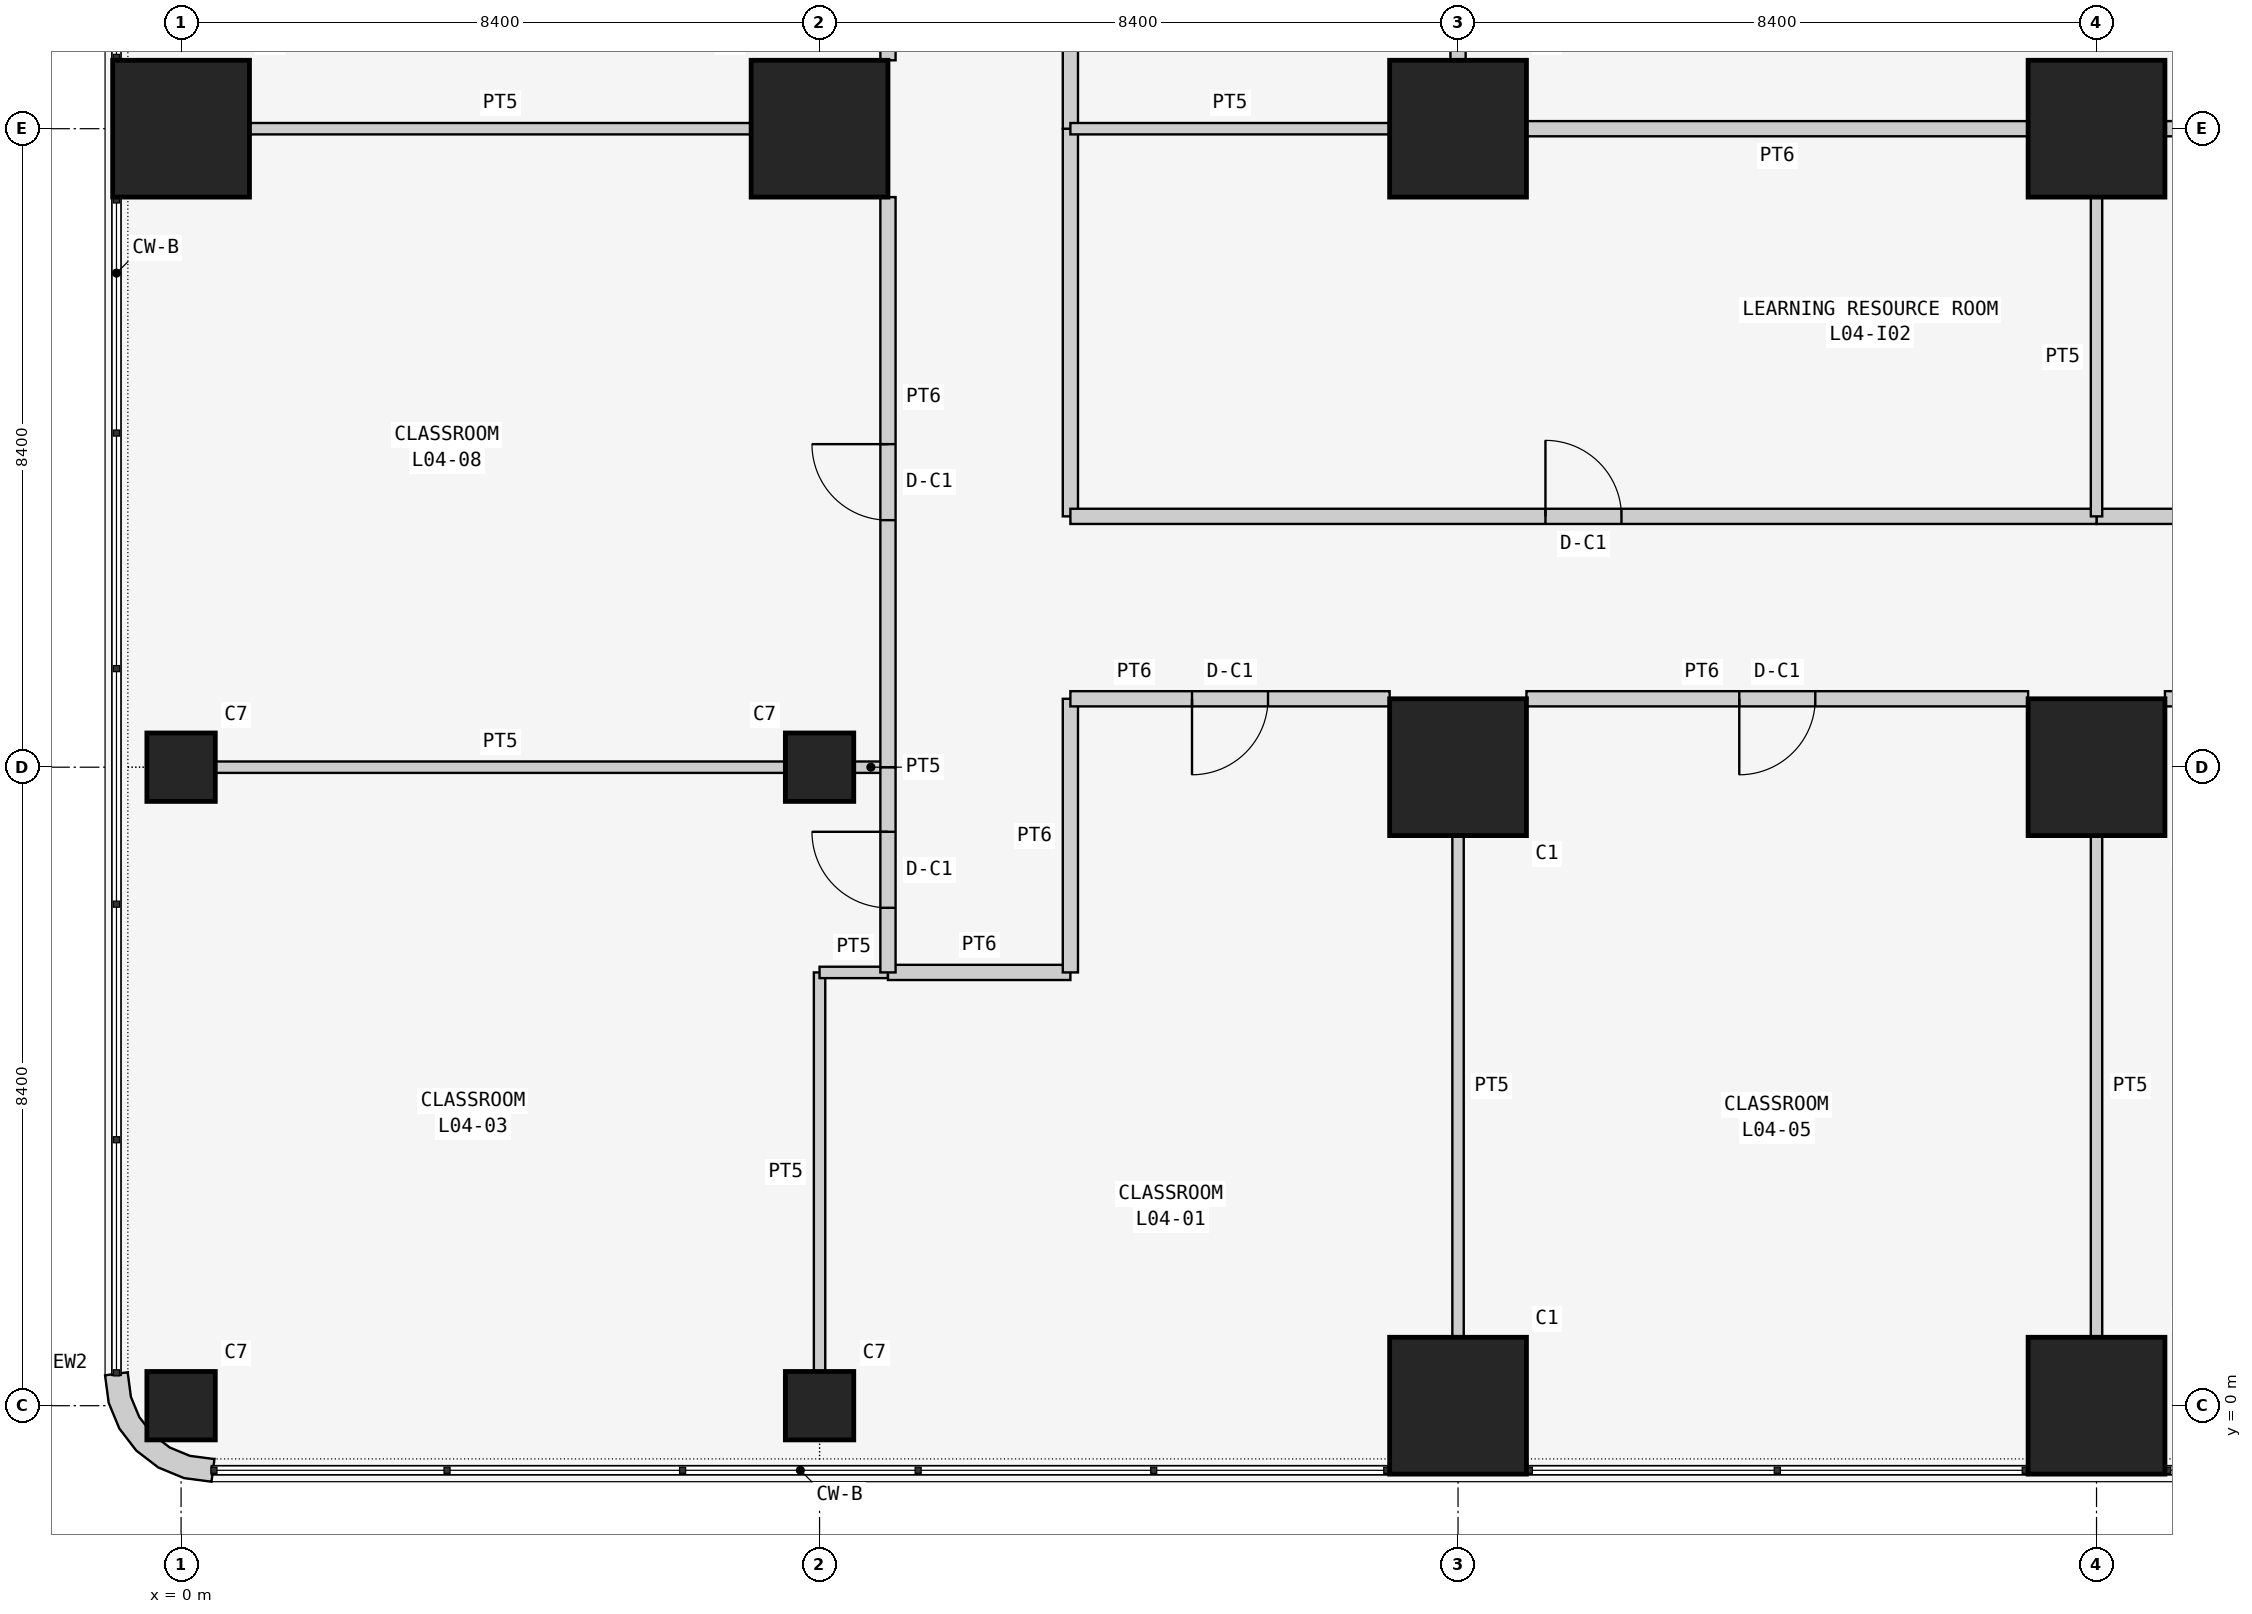
"""IFC4 building model, lengths in metres.
Left out: names, types, materials, properties, quantities, classifications, styles, units other than length and angle.
Written with IfcOpenShell. Run it as: python <this file> out.ifc"""

import sys

from ifc_helpers import new_model, si_unit, direction, frame, frame_2d, origin, origin_2d, place, context, subcontext, project, spatial, polyline, rectangle, outline, extrude, element, fill, save


model = new_model("IFC4")
c1 = context("Model", 3, precision=1e-05, world=origin(), true_north=direction((0.0, 1.0)))
c2 = subcontext(c1, "Body", "Model", "MODEL_VIEW")
j1 = project(units=[si_unit("LENGTHUNIT", "METRE"), si_unit("PLANEANGLEUNIT", "RADIAN")], contexts=[c1])
p1 = place(None, origin())
s1 = spatial("IfcSite", under=j1, at=p1, CompositionType="ELEMENT")
p2 = place(p1, origin())
s2 = spatial("IfcBuilding", under=s1, at=p2, CompositionType="ELEMENT")
p3 = place(p2, frame((0.0, 0.0, 19.5)))
s3 = spatial("IfcBuildingStorey", under=s2, at=p3, CompositionType="ELEMENT", Elevation=19.5)
for number, where, z_axis, x_axis in (
    (1, (0.0, 0.0, 0.0), (0.0, 0.0, 1.0), (1.0, 0.0, 0.0)),
    (2, (0.0, 8.4, 0.0), (0.0, 0.0, 1.0), (1.0, 0.0, 0.0)),
):
    element("IfcColumn", number, at=place(p3, frame(where, z_axis=z_axis, x_axis=x_axis)), inside=s3, PredefinedType="COLUMN", context=c2, shape_type="SweptSolid", body=[
        extrude(rectangle(XDim=0.9, YDim=0.9, at=origin_2d()), origin(), (0.0, 0.0, 1.0), 4.5),
    ])
p4 = place(p3, frame((0.0, 16.8, 0.0), z_axis=(0.0, 0.0, 1.0), x_axis=(1.0, 0.0, 0.0)))
e3 = element("IfcColumn", 3, at=p4, inside=s3, PredefinedType="COLUMN", context=c2, shape_type="SweptSolid", body=[
    extrude(rectangle(XDim=1.8, YDim=1.8, at=origin_2d()), origin(), (0.0, 0.0, 1.0), 4.5),
])
for number, where, z_axis, x_axis in (
    (4, (8.4, 0.0, 0.0), (0.0, 0.0, 1.0), (1.0, 0.0, 0.0)),
    (5, (8.4, 8.4, 0.0), (0.0, 0.0, 1.0), (1.0, 0.0, 0.0)),
):
    element("IfcColumn", number, at=place(p3, frame(where, z_axis=z_axis, x_axis=x_axis)), inside=s3, PredefinedType="COLUMN", context=c2, shape_type="SweptSolid", body=[
        extrude(rectangle(XDim=0.9, YDim=0.9, at=origin_2d()), origin(), (0.0, 0.0, 1.0), 4.5),
    ])
for number, where, z_axis, x_axis in (
    (6, (8.4, 16.8, 0.0), (0.0, 0.0, 1.0), (1.0, 0.0, 0.0)),
    (7, (16.8, 0.0, 0.0), (0.0, 0.0, 1.0), (1.0, 0.0, 0.0)),
    (8, (16.8, 8.4, 0.0), (0.0, 0.0, 1.0), (1.0, 0.0, 0.0)),
    (9, (16.8, 16.8, 0.0), (0.0, 0.0, 1.0), (1.0, 0.0, 0.0)),
    (10, (25.2, 0.0, 0.0), (0.0, 0.0, 1.0), (1.0, 0.0, 0.0)),
    (11, (25.2, 8.4, 0.0), (0.0, 0.0, 1.0), (1.0, 0.0, 0.0)),
    (12, (25.2, 16.8, 0.0), (0.0, 0.0, 1.0), (1.0, 0.0, 0.0)),
):
    element("IfcColumn", number, at=place(p3, frame(where, z_axis=z_axis, x_axis=x_axis)), inside=s3, PredefinedType="COLUMN", context=c2, shape_type="SweptSolid", body=[
        extrude(rectangle(XDim=1.8, YDim=1.8, at=origin_2d()), origin(), (0.0, 0.0, 1.0), 4.5),
    ])
p5 = place(p3, frame((-0.848, 0.445, 0.0), z_axis=(0.0, 0.0, 1.0), x_axis=(-0.707106781187, -0.707106781187, 0.0)))
e13 = element("IfcWall", 13, at=p5, inside=s3, PredefinedType="SOLIDWALL", context=c2, shape_type="SweptSolid", body=[
    extrude(outline(polyline([(0.139, 1.904), (-0.101, 1.72), (-0.087, 1.706), (0.1, 1.463), (0.209, 1.198), (0.247, 0.914), (0.209, 0.63), (0.1, 0.365), (-0.087, 0.122), (-0.101, 0.108), (0.139, -0.076), (0.362, 0.214), (0.502, 0.552), (0.549, 0.914), (0.502, 1.276), (0.362, 1.614), (0.139, 1.904)])), origin(), (0.0, 0.0, 1.0), 4.3),
])
p6 = place(p3, frame((8.4, 0.45, 0.0), z_axis=(0.0, 0.0, 1.0), x_axis=(0.0, 1.0, 0.0)))
e14 = element("IfcWall", 14, at=p6, inside=s3, PredefinedType="PARTITIONING", context=c2, shape_type="SweptSolid", body=[
    extrude(rectangle(XDim=5.25, YDim=0.15, at=frame_2d((2.625, 0.0))), origin(), (0.0, 0.0, 1.0), 3.543),
])
p7 = place(p3, frame((8.4, 5.7, 0.0), z_axis=(0.0, 0.0, 1.0), x_axis=(1.0, 0.0, 0.0)))
e15 = element("IfcWall", 15, at=p7, inside=s3, PredefinedType="PARTITIONING", context=c2, shape_type="SweptSolid", body=[
    extrude(rectangle(XDim=0.9, YDim=0.15, at=frame_2d((0.45, 0.0))), origin(), (0.0, 0.0, 1.0), 4.3),
])
p8 = place(p3, frame((16.8, 7.5, 0.0), z_axis=(0.0, 0.0, 1.0), x_axis=(0.0, -1.0, 0.0)))
e16 = element("IfcWall", 16, at=p8, inside=s3, PredefinedType="PARTITIONING", context=c2, shape_type="SweptSolid", body=[
    extrude(rectangle(XDim=6.6, YDim=0.15, at=frame_2d((3.3, 0.0))), origin(), (0.0, 0.0, 1.0), 3.543),
])
p9 = place(p3, frame((9.3, 5.7, 0.0), z_axis=(0.0, 0.0, 1.0), x_axis=(1.0, 0.0, 0.0)))
e17 = element("IfcWall", 17, at=p9, inside=s3, PredefinedType="PARTITIONING", context=c2, shape_type="SweptSolid", body=[
    extrude(rectangle(XDim=2.4, YDim=0.2, at=frame_2d((1.2, 0.0))), origin(), (0.0, 0.0, 1.0), 4.3),
])
p10 = place(p3, frame((11.7, 5.7, 0.0), z_axis=(0.0, 0.0, 1.0), x_axis=(0.0, 1.0, 0.0)))
e18 = element("IfcWall", 18, at=p10, inside=s3, PredefinedType="PARTITIONING", context=c2, shape_type="SweptSolid", body=[
    extrude(rectangle(XDim=3.6, YDim=0.2, at=frame_2d((1.8, 0.0))), origin(), (0.0, 0.0, 1.0), 4.3),
])
p11 = place(p3, frame((11.7, 9.3, 0.0), z_axis=(0.0, 0.0, 1.0), x_axis=(1.0, 0.0, 0.0)))
e19 = element("IfcWall", 19, at=p11, inside=s3, PredefinedType="PARTITIONING", context=c2, shape_type="SweptSolid", body=[
    extrude(rectangle(XDim=4.2, YDim=0.2, at=frame_2d((2.1, 0.0))), origin(), (0.0, 0.0, 1.0), 4.3),
])
p12 = place(p11, frame((1.6, 0.0, 0.0)))
e20 = element("IfcOpeningElement", 20, at=p12, cuts=e19, PredefinedType="OPENING", context=c2, shape_type="SweptSolid", body=[
    extrude(rectangle(XDim=1.0, YDim=2.1, at=frame_2d((0.5, 1.05))), frame((0.0, 0.11, 0.0), z_axis=(0.0, -1.0, 0.0), x_axis=(1.0, 0.0, 0.0)), (0.0, 0.0, 1.0), 0.22),
])
p13 = place(p3, frame((0.45, 8.4, 0.0), z_axis=(0.0, 0.0, 1.0), x_axis=(1.0, 0.0, 0.0)))
e21 = element("IfcWall", 21, at=p13, inside=s3, PredefinedType="PARTITIONING", context=c2, shape_type="SweptSolid", body=[
    extrude(rectangle(XDim=7.5, YDim=0.15, at=frame_2d((3.75, 0.0))), origin(), (0.0, 0.0, 1.0), 3.543),
])
p14 = place(p3, frame((8.85, 8.4, 0.0), z_axis=(0.0, 0.0, 1.0), x_axis=(1.0, 0.0, 0.0)))
e22 = element("IfcWall", 22, at=p14, inside=s3, PredefinedType="PARTITIONING", context=c2, shape_type="SweptSolid", body=[
    extrude(rectangle(XDim=0.45, YDim=0.15, at=frame_2d((0.225, 0.0))), origin(), (0.0, 0.0, 1.0), 3.543),
])
p15 = place(p3, frame((9.3, 8.4, 0.0), z_axis=(0.0, 0.0, 1.0), x_axis=(0.0, -1.0, 0.0)))
e23 = element("IfcWall", 23, at=p15, inside=s3, PredefinedType="PARTITIONING", context=c2, shape_type="SweptSolid", body=[
    extrude(rectangle(XDim=2.7, YDim=0.2, at=frame_2d((1.35, 0.0))), origin(), (0.0, 0.0, 1.0), 4.3),
])
p16 = place(p15, frame((0.85, 0.0, 0.0)))
e24 = element("IfcOpeningElement", 24, at=p16, cuts=e23, PredefinedType="OPENING", context=c2, shape_type="SweptSolid", body=[
    extrude(rectangle(XDim=1.0, YDim=2.1, at=frame_2d((0.5, 1.05))), frame((0.0, 0.11, 0.0), z_axis=(0.0, -1.0, 0.0), x_axis=(1.0, 0.0, 0.0)), (0.0, 0.0, 1.0), 0.22),
])
p17 = place(p3, frame((25.2, 7.5, 0.0), z_axis=(0.0, 0.0, 1.0), x_axis=(0.0, -1.0, 0.0)))
e25 = element("IfcWall", 25, at=p17, inside=s3, PredefinedType="PARTITIONING", context=c2, shape_type="SweptSolid", body=[
    extrude(rectangle(XDim=6.6, YDim=0.15, at=frame_2d((3.3, 0.0))), origin(), (0.0, 0.0, 1.0), 3.543),
])
p18 = place(p3, frame((17.7, 9.3, 0.0), z_axis=(0.0, 0.0, 1.0), x_axis=(1.0, 0.0, 0.0)))
e26 = element("IfcWall", 26, at=p18, inside=s3, PredefinedType="PARTITIONING", context=c2, shape_type="SweptSolid", body=[
    extrude(rectangle(XDim=6.6, YDim=0.2, at=frame_2d((3.3, 0.0))), origin(), (0.0, 0.0, 1.0), 4.3),
])
p19 = place(p18, frame((2.8, 0.0, 0.0)))
e27 = element("IfcOpeningElement", 27, at=p19, cuts=e26, PredefinedType="OPENING", context=c2, shape_type="SweptSolid", body=[
    extrude(rectangle(XDim=1.0, YDim=2.1, at=frame_2d((0.5, 1.05))), frame((0.0, 0.11, 0.0), z_axis=(0.0, -1.0, 0.0), x_axis=(1.0, 0.0, 0.0)), (0.0, 0.0, 1.0), 0.22),
])
p20 = place(p3, frame((26.1, 9.3, 0.0), z_axis=(0.0, 0.0, 1.0), x_axis=(1.0, 0.0, 0.0)))
e28 = element("IfcWall", 28, at=p20, inside=s3, PredefinedType="PARTITIONING", context=c2, shape_type="SweptSolid", body=[
    extrude(rectangle(XDim=6.6, YDim=0.2, at=frame_2d((3.3, 0.0))), origin(), (0.0, 0.0, 1.0), 4.3),
])
p21 = place(p20, frame((2.8, 0.0, 0.0)))
e29 = element("IfcOpeningElement", 29, at=p21, cuts=e28, PredefinedType="OPENING", context=c2, shape_type="SweptSolid", body=[
    extrude(rectangle(XDim=1.0, YDim=2.1, at=frame_2d((0.5, 1.05))), frame((0.0, 0.11, 0.0), z_axis=(0.0, -1.0, 0.0), x_axis=(1.0, 0.0, 0.0)), (0.0, 0.0, 1.0), 0.22),
])
p22 = place(p3, frame((0.9, 16.8, 0.0), z_axis=(0.0, 0.0, 1.0), x_axis=(1.0, 0.0, 0.0)))
e30 = element("IfcWall", 30, at=p22, inside=s3, PredefinedType="PARTITIONING", context=c2, shape_type="SweptSolid", body=[
    extrude(rectangle(XDim=6.6, YDim=0.15, at=frame_2d((3.3, 0.0))), origin(), (0.0, 0.0, 1.0), 3.543),
])
p23 = place(p3, frame((9.3, 15.9, 0.0), z_axis=(0.0, 0.0, 1.0), x_axis=(0.0, -1.0, 0.0)))
e31 = element("IfcWall", 31, at=p23, inside=s3, PredefinedType="PARTITIONING", context=c2, shape_type="SweptSolid", body=[
    extrude(rectangle(XDim=7.5, YDim=0.2, at=frame_2d((3.75, 0.0))), origin(), (0.0, 0.0, 1.0), 4.3),
])
p24 = place(p23, frame((3.25, 0.0, 0.0)))
e32 = element("IfcOpeningElement", 32, at=p24, cuts=e31, PredefinedType="OPENING", context=c2, shape_type="SweptSolid", body=[
    extrude(rectangle(XDim=1.0, YDim=2.1, at=frame_2d((0.5, 1.05))), frame((0.0, 0.11, 0.0), z_axis=(0.0, -1.0, 0.0), x_axis=(1.0, 0.0, 0.0)), (0.0, 0.0, 1.0), 0.22),
])
p25 = place(p3, frame((9.3, 24.3, 0.0), z_axis=(0.0, 0.0, 1.0), x_axis=(0.0, -1.0, 0.0)))
e33 = element("IfcWall", 33, at=p25, inside=s3, PredefinedType="PARTITIONING", context=c2, shape_type="SweptSolid", body=[
    extrude(rectangle(XDim=6.6, YDim=0.2, at=frame_2d((3.3, 0.0))), origin(), (0.0, 0.0, 1.0), 4.3),
])
p26 = place(p25, frame((2.8, 0.0, 0.0)))
e34 = element("IfcOpeningElement", 34, at=p26, cuts=e33, PredefinedType="OPENING", context=c2, shape_type="SweptSolid", body=[
    extrude(rectangle(XDim=1.0, YDim=2.1, at=frame_2d((0.5, 1.05))), frame((0.0, 0.11, 0.0), z_axis=(0.0, -1.0, 0.0), x_axis=(1.0, 0.0, 0.0)), (0.0, 0.0, 1.0), 0.22),
])
p27 = place(p3, frame((25.2, 11.7, 0.0), z_axis=(0.0, 0.0, 1.0), x_axis=(1.0, 0.0, 0.0)))
e35 = element("IfcWall", 35, at=p27, inside=s3, PredefinedType="PARTITIONING", context=c2, shape_type="SweptSolid", body=[
    extrude(rectangle(XDim=16.8, YDim=0.2, at=frame_2d((8.4, 0.0))), origin(), (0.0, 0.0, 1.0), 4.3),
])
p28 = place(p27, frame((7.9, 0.0, 0.0)))
e36 = element("IfcOpeningElement", 36, at=p28, cuts=e35, PredefinedType="OPENING", context=c2, shape_type="SweptSolid", body=[
    extrude(rectangle(XDim=1.0, YDim=2.1, at=frame_2d((0.5, 1.05))), frame((0.0, 0.11, 0.0), z_axis=(0.0, -1.0, 0.0), x_axis=(1.0, 0.0, 0.0)), (0.0, 0.0, 1.0), 0.22),
])
p29 = place(p3, frame((11.7, 16.8, 0.0), z_axis=(0.0, 0.0, 1.0), x_axis=(0.0, -1.0, 0.0)))
e37 = element("IfcWall", 37, at=p29, inside=s3, PredefinedType="PARTITIONING", context=c2, shape_type="SweptSolid", body=[
    extrude(rectangle(XDim=5.1, YDim=0.2, at=frame_2d((2.55, 0.0))), origin(), (0.0, 0.0, 1.0), 4.3),
])
p30 = place(p3, frame((11.7, 11.7, 0.0), z_axis=(0.0, 0.0, 1.0), x_axis=(1.0, 0.0, 0.0)))
e38 = element("IfcWall", 38, at=p30, inside=s3, PredefinedType="PARTITIONING", context=c2, shape_type="SweptSolid", body=[
    extrude(rectangle(XDim=13.5, YDim=0.2, at=frame_2d((6.75, 0.0))), origin(), (0.0, 0.0, 1.0), 4.3),
])
p31 = place(p30, frame((6.25, 0.0, 0.0)))
e39 = element("IfcOpeningElement", 39, at=p31, cuts=e38, PredefinedType="OPENING", context=c2, shape_type="SweptSolid", body=[
    extrude(rectangle(XDim=1.0, YDim=2.1, at=frame_2d((0.5, 1.05))), frame((0.0, 0.11, 0.0), z_axis=(0.0, -1.0, 0.0), x_axis=(1.0, 0.0, 0.0)), (0.0, 0.0, 1.0), 0.22),
])
p32 = place(p3, frame((11.7, 25.2, 0.0), z_axis=(0.0, 0.0, 1.0), x_axis=(0.0, -1.0, 0.0)))
e40 = element("IfcWall", 40, at=p32, inside=s3, PredefinedType="PARTITIONING", context=c2, shape_type="SweptSolid", body=[
    extrude(rectangle(XDim=8.4, YDim=0.2, at=frame_2d((4.2, 0.0))), origin(), (0.0, 0.0, 1.0), 4.3),
])
p33 = place(p32, frame((3.7, 0.0, 0.0)))
e41 = element("IfcOpeningElement", 41, at=p33, cuts=e40, PredefinedType="OPENING", context=c2, shape_type="SweptSolid", body=[
    extrude(rectangle(XDim=1.0, YDim=2.1, at=frame_2d((0.5, 1.05))), frame((0.0, 0.11, 0.0), z_axis=(0.0, -1.0, 0.0), x_axis=(1.0, 0.0, 0.0)), (0.0, 0.0, 1.0), 0.22),
])
p34 = place(p3, frame((32.7, 16.8, 0.0), z_axis=(0.0, 0.0, 1.0), x_axis=(-1.0, 0.0, 0.0)))
e42 = element("IfcWall", 42, at=p34, inside=s3, PredefinedType="PARTITIONING", context=c2, shape_type="SweptSolid", body=[
    extrude(rectangle(XDim=6.6, YDim=0.2, at=frame_2d((3.3, 0.0))), origin(), (0.0, 0.0, 1.0), 3.543),
])
for number, where, z_axis, x_axis in (
    (43, (24.3, 16.8, 0.0), (0.0, 0.0, 1.0), (-1.0, 0.0, 0.0)),
    (44, (16.8, 17.7, 0.0), (0.0, 0.0, 1.0), (0.0, 1.0, 0.0)),
):
    element("IfcWall", number, at=place(p3, frame(where, z_axis=z_axis, x_axis=x_axis)), inside=s3, PredefinedType="PARTITIONING", context=c2, shape_type="SweptSolid", body=[
        extrude(rectangle(XDim=6.6, YDim=0.2, at=frame_2d((3.3, 0.0))), origin(), (0.0, 0.0, 1.0), 3.543),
    ])
for number, where, z_axis, x_axis in (
    (45, (25.2, 11.7, 0.0), (0.0, 0.0, 1.0), (0.0, 1.0, 0.0)),
    (46, (11.7, 16.8, 0.0), (0.0, 0.0, 1.0), (1.0, 0.0, 0.0)),
):
    element("IfcWall", number, at=place(p3, frame(where, z_axis=z_axis, x_axis=x_axis)), inside=s3, PredefinedType="PARTITIONING", context=c2, shape_type="SweptSolid", body=[
        extrude(rectangle(XDim=4.2, YDim=0.15, at=frame_2d((2.1, 0.0))), origin(), (0.0, 0.0, 1.0), 3.543),
    ])
p35 = place(p12, frame((1.0, 0.0, 0.0), z_axis=(0.0, 0.0, 1.0), x_axis=(-1.0, 0.0, 0.0)))
e47 = element("IfcDoor", 47, at=p35, inside=s3, OperationType="SINGLE_SWING_RIGHT", PredefinedType="DOOR", context=c2, shape_type="SweptSolid", body=[
    extrude(rectangle(XDim=1.0, YDim=2.1, at=frame_2d((0.5, 1.05))), frame((0.0, 0.025, 0.0), z_axis=(0.0, -1.0, 0.0), x_axis=(1.0, 0.0, 0.0)), (0.0, 0.0, 1.0), 0.05),
])
fill(e20, e47)
p36 = place(p16, frame((1.0, 0.0, 0.0), z_axis=(0.0, 0.0, 1.0), x_axis=(-1.0, 0.0, 0.0)))
e48 = element("IfcDoor", 48, at=p36, inside=s3, OperationType="SINGLE_SWING_RIGHT", PredefinedType="DOOR", context=c2, shape_type="SweptSolid", body=[
    extrude(rectangle(XDim=1.0, YDim=2.1, at=frame_2d((0.5, 1.05))), frame((0.0, 0.025, 0.0), z_axis=(0.0, -1.0, 0.0), x_axis=(1.0, 0.0, 0.0)), (0.0, 0.0, 1.0), 0.05),
])
fill(e24, e48)
p37 = place(p19, frame((1.0, 0.0, 0.0), z_axis=(0.0, 0.0, 1.0), x_axis=(-1.0, 0.0, 0.0)))
e49 = element("IfcDoor", 49, at=p37, inside=s3, OperationType="SINGLE_SWING_RIGHT", PredefinedType="DOOR", context=c2, shape_type="SweptSolid", body=[
    extrude(rectangle(XDim=1.0, YDim=2.1, at=frame_2d((0.5, 1.05))), frame((0.0, 0.025, 0.0), z_axis=(0.0, -1.0, 0.0), x_axis=(1.0, 0.0, 0.0)), (0.0, 0.0, 1.0), 0.05),
])
fill(e27, e49)
p38 = place(p24, frame((1.0, 0.0, 0.0), z_axis=(0.0, 0.0, 1.0), x_axis=(-1.0, 0.0, 0.0)))
e50 = element("IfcDoor", 50, at=p38, inside=s3, OperationType="SINGLE_SWING_RIGHT", PredefinedType="DOOR", context=c2, shape_type="SweptSolid", body=[
    extrude(rectangle(XDim=1.0, YDim=2.1, at=frame_2d((0.5, 1.05))), frame((0.0, 0.025, 0.0), z_axis=(0.0, -1.0, 0.0), x_axis=(1.0, 0.0, 0.0)), (0.0, 0.0, 1.0), 0.05),
])
fill(e32, e50)
p39 = place(p31, origin())
e51 = element("IfcDoor", 51, at=p39, inside=s3, OperationType="SINGLE_SWING_LEFT", PredefinedType="DOOR", context=c2, shape_type="SweptSolid", body=[
    extrude(rectangle(XDim=1.0, YDim=2.1, at=frame_2d((0.5, 1.05))), frame((0.0, 0.025, 0.0), z_axis=(0.0, -1.0, 0.0), x_axis=(1.0, 0.0, 0.0)), (0.0, 0.0, 1.0), 0.05),
])
fill(e39, e51)
save(model, sys.argv[1])
